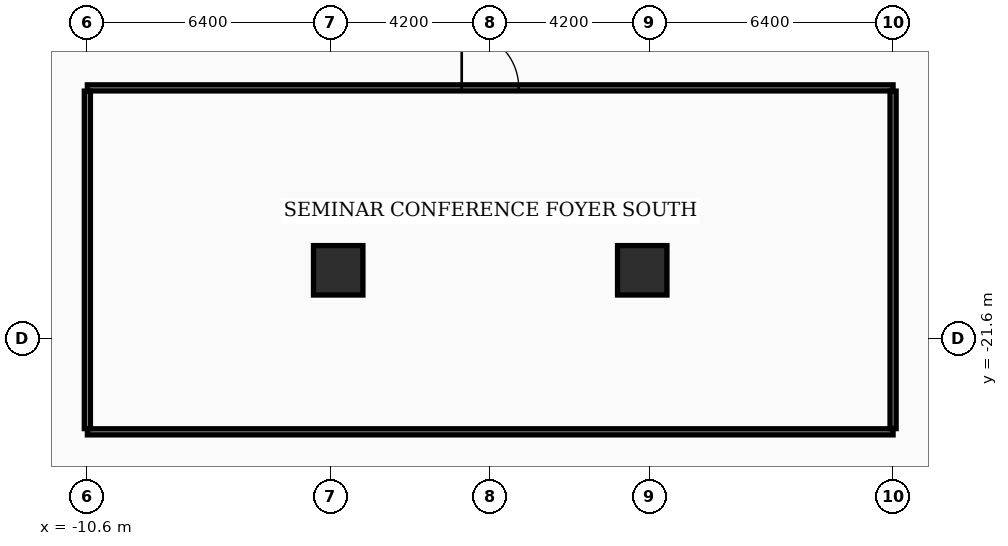
"""IFC4 building model, lengths in metres.
Left out: names, types, materials, properties, quantities, classifications, styles, units other than length and angle.
Written with IfcOpenShell. Run it as: python <this file> out.ifc"""

import sys

from ifc_helpers import new_model, si_unit, direction, frame, frame_2d, origin, origin_2d, place, context, subcontext, project, spatial, rectangle, extrude, element, fill, save


model = new_model("IFC4")
c1 = context("Model", 3, precision=1e-05, world=origin(), true_north=direction((0.0, 1.0)))
c2 = subcontext(c1, "Body", "Model", "MODEL_VIEW")
j1 = project(units=[si_unit("LENGTHUNIT", "METRE"), si_unit("PLANEANGLEUNIT", "RADIAN")], contexts=[c1])
p1 = place(None, origin())
s1 = spatial("IfcSite", under=j1, at=p1, CompositionType="ELEMENT")
p2 = place(p1, origin())
s2 = spatial("IfcBuilding", under=s1, at=p2, CompositionType="ELEMENT")
p3 = place(p2, frame((0.0, 0.0, 10.2)))
s3 = spatial("IfcBuildingStorey", under=s2, at=p3, CompositionType="ELEMENT", Elevation=10.2)
for number, where, z_axis, x_axis in (
    (1, (-4.0, -19.8, 0.0), (0.0, 0.0, 1.0), (1.0, 0.0, 0.0)),
    (2, (4.0, -19.8, 0.0), (0.0, 0.0, 1.0), (1.0, 0.0, 0.0)),
):
    element("IfcColumn", number, at=place(p3, frame(where, z_axis=z_axis, x_axis=x_axis)), inside=s3, PredefinedType="COLUMN", context=c2, shape_type="SweptSolid", body=[
        extrude(rectangle(XDim=1.3, YDim=1.3, at=origin_2d()), origin(), (0.0, 0.0, 1.0), 4.5),
    ])
p4 = place(p3, frame((-10.6, -24.05, 0.0), z_axis=(0.0, 0.0, 1.0), x_axis=(1.0, 0.0, 0.0)))
e3 = element("IfcWall", 3, at=p4, inside=s3, PredefinedType="PARTITIONING", context=c2, shape_type="SweptSolid", body=[
    extrude(rectangle(XDim=21.2, YDim=0.16, at=frame_2d((10.6, 0.0))), origin(), (0.0, 0.0, 1.0), 3.32),
])
p5 = place(p3, frame((-10.6, -15.0, 0.0), z_axis=(0.0, 0.0, 1.0), x_axis=(1.0, 0.0, 0.0)))
e4 = element("IfcWall", 4, at=p5, inside=s3, PredefinedType="PARTITIONING", context=c2, shape_type="SweptSolid", body=[
    extrude(rectangle(XDim=21.2, YDim=0.16, at=frame_2d((10.6, 0.0))), origin(), (0.0, 0.0, 1.0), 3.32),
])
p6 = place(p5, frame((9.85, 0.0, 0.0)))
e5 = element("IfcOpeningElement", 5, at=p6, cuts=e4, PredefinedType="OPENING", context=c2, shape_type="SweptSolid", body=[
    extrude(rectangle(XDim=1.5, YDim=2.15, at=frame_2d((0.75, 1.075))), frame((0.0, 0.09, 0.0), z_axis=(0.0, -1.0, 0.0), x_axis=(1.0, 0.0, 0.0)), (0.0, 0.0, 1.0), 0.18),
])
for number, where, z_axis, x_axis in (
    (6, (-10.6, -23.965, 0.0), (0.0, 0.0, 1.0), (0.0, 1.0, 0.0)),
    (7, (10.6, -23.965, 0.0), (0.0, 0.0, 1.0), (0.0, 1.0, 0.0)),
):
    element("IfcWall", number, at=place(p3, frame(where, z_axis=z_axis, x_axis=x_axis)), inside=s3, PredefinedType="PARTITIONING", context=c2, shape_type="SweptSolid", body=[
        extrude(rectangle(XDim=8.88, YDim=0.16, at=frame_2d((4.44, 0.0))), origin(), (0.0, 0.0, 1.0), 3.32),
    ])
p7 = place(p6, origin())
e8 = element("IfcDoor", 8, at=p7, inside=s3, OperationType="DOUBLE_DOOR_SINGLE_SWING", PredefinedType="DOOR", context=c2, shape_type="SweptSolid", body=[
    extrude(rectangle(XDim=1.5, YDim=2.15, at=frame_2d((0.75, 1.075))), frame((0.0, 0.025, 0.0), z_axis=(0.0, -1.0, 0.0), x_axis=(1.0, 0.0, 0.0)), (0.0, 0.0, 1.0), 0.05),
])
fill(e5, e8)
save(model, sys.argv[1])
